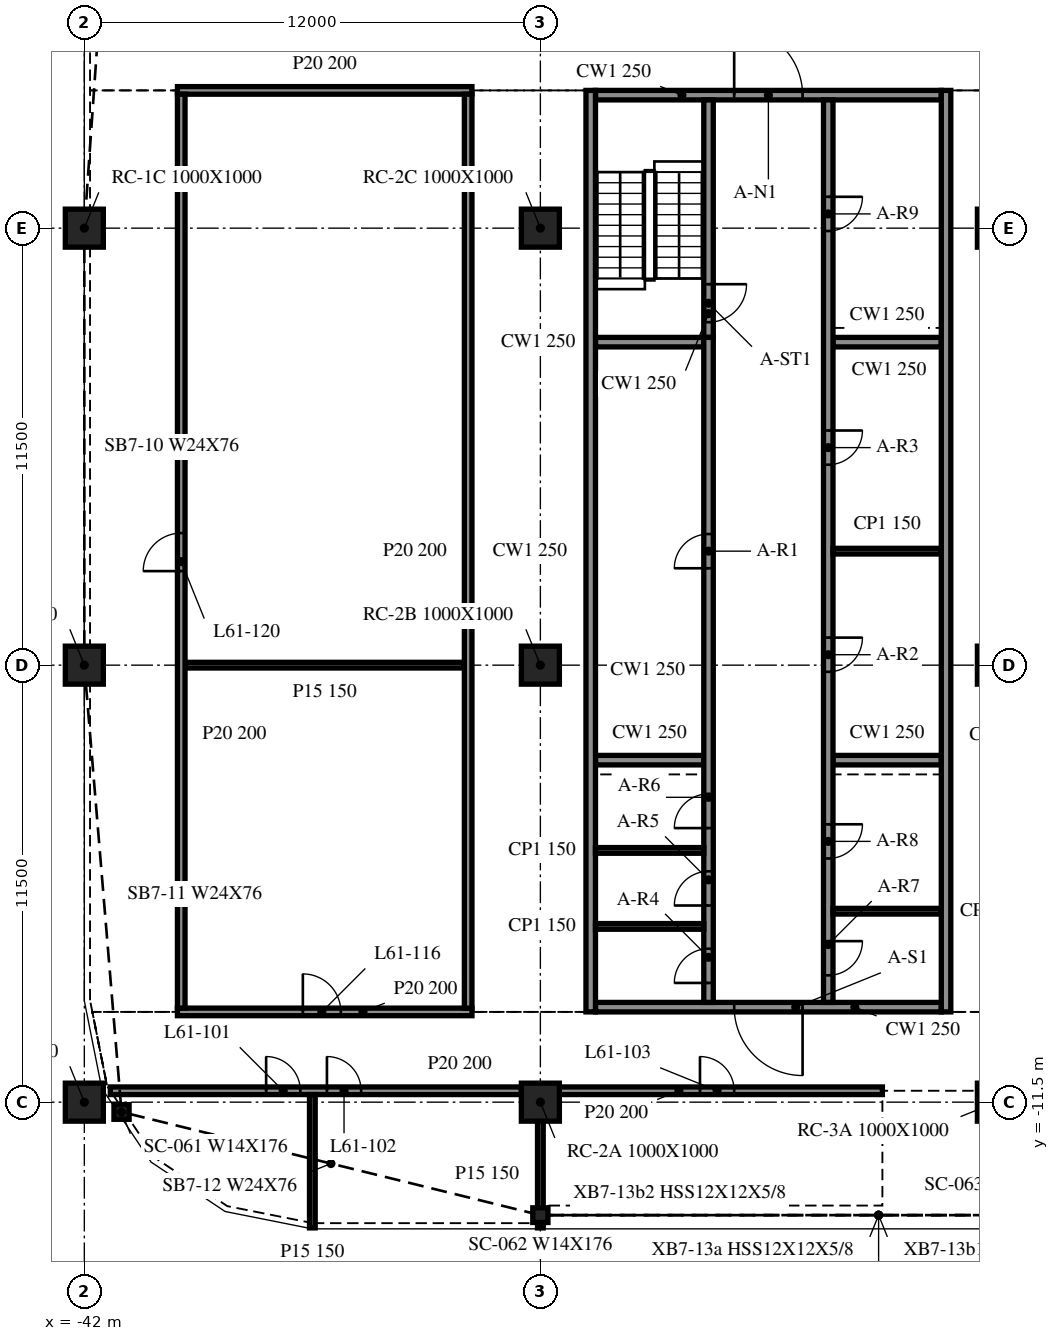
"""IFC4 building model, lengths in metres.
Left out: names, types, materials, properties, quantities, classifications, styles, units other than length and angle.
Written with IfcOpenShell. Run it as: python <this file> out.ifc"""

import sys

from ifc_helpers import new_model, si_unit, direction, frame, frame_2d, origin, origin_2d, place, context, subcontext, project, spatial, rectangle, i_section, extrude, element, fill, save


model = new_model("IFC4")
c1 = context("Model", 3, precision=1e-05, world=origin(), true_north=direction((0.0, 1.0)))
c2 = subcontext(c1, "Body", "Model", "MODEL_VIEW")
j1 = project(units=[si_unit("LENGTHUNIT", "METRE"), si_unit("PLANEANGLEUNIT", "RADIAN")], contexts=[c1])
p1 = place(None, origin())
s1 = spatial("IfcSite", under=j1, at=p1, CompositionType="ELEMENT")
p2 = place(p1, origin())
s2 = spatial("IfcBuilding", under=s1, at=p2, CompositionType="ELEMENT")
p3 = place(p2, frame((0.0, 0.0, 251.4)))
s3 = spatial("IfcBuildingStorey", under=s2, at=p3, CompositionType="ELEMENT", Elevation=251.4)
for number, where, z_axis, x_axis in (
    (1, (-42.0, -11.5, -0.34), (0.0, 0.0, 1.0), (1.0, 0.0, 0.0)),
    (2, (-42.0, 0.0, -0.34), (0.0, 0.0, 1.0), (1.0, 0.0, 0.0)),
    (3, (-42.0, 11.5, -0.34), (0.0, 0.0, 1.0), (1.0, 0.0, 0.0)),
    (4, (-30.0, -11.5, -0.34), (0.0, 0.0, 1.0), (1.0, 0.0, 0.0)),
    (5, (-30.0, 0.0, -0.34), (0.0, 0.0, 1.0), (1.0, 0.0, 0.0)),
    (6, (-30.0, 11.5, -0.34), (0.0, 0.0, 1.0), (1.0, 0.0, 0.0)),
    (7, (-18.0, -11.5, -0.34), (0.0, 0.0, 1.0), (1.0, 0.0, 0.0)),
    (8, (-18.0, 0.0, -0.34), (0.0, 0.0, 1.0), (1.0, 0.0, 0.0)),
    (9, (-18.0, 11.5, -0.34), (0.0, 0.0, 1.0), (1.0, 0.0, 0.0)),
):
    element("IfcColumn", number, at=place(p3, frame(where, z_axis=z_axis, x_axis=x_axis)), inside=s3, PredefinedType="COLUMN", context=c2, shape_type="SweptSolid", body=[
        extrude(rectangle(XDim=1.0, YDim=1.0, at=origin_2d()), origin(), (0.0, 0.0, 1.0), 3.8),
    ])
for number, where, z_axis, x_axis in (
    (10, (-41.021, -11.758, -0.34), (0.0, 0.0, 1.0), (1.0, 0.0, 0.0)),
    (11, (-30.0, -14.473, -0.34), (0.0, 0.0, 1.0), (1.0, 0.0, 0.0)),
):
    element("IfcColumn", number, at=place(p3, frame(where, z_axis=z_axis, x_axis=x_axis)), inside=s3, PredefinedType="COLUMN", context=c2, shape_type="SweptSolid", body=[
        extrude(i_section(OverallWidth=0.399, OverallDepth=0.386, WebThickness=0.021, FlangeThickness=0.033, at=origin_2d()), origin(), (0.0, 0.0, 1.0), 3.8),
    ])
for number, where, z_axis, x_axis in (
    (12, (-28.675, 15.125, 0.0), (0.0, 0.0, 1.0), (0.0, -1.0, 0.0)),
    (13, (-19.325, -9.125, 0.0), (0.0, 0.0, 1.0), (0.0, 1.0, 0.0)),
):
    element("IfcWall", number, at=place(p3, frame(where, z_axis=z_axis, x_axis=x_axis)), inside=s3, PredefinedType="SOLIDWALL", context=c2, shape_type="SweptSolid", body=[
        extrude(rectangle(XDim=24.25, YDim=0.25, at=frame_2d((12.125, 0.0))), origin(), (0.0, 0.0, 1.0), 3.46),
    ])
p4 = place(p3, frame((-19.45, -9.0, 0.0), z_axis=(0.0, 0.0, 1.0), x_axis=(-1.0, 0.0, 0.0)))
e14 = element("IfcWall", 14, at=p4, inside=s3, PredefinedType="SOLIDWALL", context=c2, shape_type="SweptSolid", body=[
    extrude(rectangle(XDim=9.1, YDim=0.25, at=frame_2d((4.55, 0.0))), origin(), (0.0, 0.0, 1.0), 3.46),
])
p5 = place(p4, frame((3.65, 0.0, 0.0)))
e15 = element("IfcOpeningElement", 15, at=p5, cuts=e14, PredefinedType="OPENING", context=c2, shape_type="SweptSolid", body=[
    extrude(rectangle(XDim=1.8, YDim=2.1, at=frame_2d((0.9, 1.05))), frame((0.0, 0.135, 0.0), z_axis=(0.0, -1.0, 0.0), x_axis=(1.0, 0.0, 0.0)), (0.0, 0.0, 1.0), 0.27),
])
p6 = place(p3, frame((-28.55, 15.0, 0.0), z_axis=(0.0, 0.0, 1.0), x_axis=(1.0, 0.0, 0.0)))
e16 = element("IfcWall", 16, at=p6, inside=s3, PredefinedType="SOLIDWALL", context=c2, shape_type="SweptSolid", body=[
    extrude(rectangle(XDim=9.1, YDim=0.25, at=frame_2d((4.55, 0.0))), origin(), (0.0, 0.0, 1.0), 3.46),
])
p7 = place(p6, frame((3.65, 0.0, 0.0)))
e17 = element("IfcOpeningElement", 17, at=p7, cuts=e16, PredefinedType="OPENING", context=c2, shape_type="SweptSolid", body=[
    extrude(rectangle(XDim=1.8, YDim=2.1, at=frame_2d((0.9, 1.05))), frame((0.0, 0.135, 0.0), z_axis=(0.0, -1.0, 0.0), x_axis=(1.0, 0.0, 0.0)), (0.0, 0.0, 1.0), 0.27),
])
p8 = place(p3, frame((-25.575, -8.875, 0.0), z_axis=(0.0, 0.0, 1.0), x_axis=(0.0, 1.0, 0.0)))
e18 = element("IfcWall", 18, at=p8, inside=s3, PredefinedType="SOLIDWALL", context=c2, shape_type="SweptSolid", body=[
    extrude(rectangle(XDim=17.5, YDim=0.25, at=frame_2d((8.75, 0.0))), origin(), (0.0, 0.0, 1.0), 3.46),
])
p9 = place(p8, frame((11.425, 0.0, 0.0)))
e19 = element("IfcOpeningElement", 19, at=p9, cuts=e18, PredefinedType="OPENING", context=c2, shape_type="SweptSolid", body=[
    extrude(rectangle(XDim=0.9, YDim=2.1, at=frame_2d((0.45, 1.05))), frame((0.0, 0.135, 0.0), z_axis=(0.0, -1.0, 0.0), x_axis=(1.0, 0.0, 0.0)), (0.0, 0.0, 1.0), 0.27),
])
p10 = place(p8, frame((0.512, 0.0, 0.0)))
e20 = element("IfcOpeningElement", 20, at=p10, cuts=e18, PredefinedType="OPENING", context=c2, shape_type="SweptSolid", body=[
    extrude(rectangle(XDim=0.9, YDim=2.1, at=frame_2d((0.45, 1.05))), frame((0.0, 0.135, 0.0), z_axis=(0.0, -1.0, 0.0), x_axis=(1.0, 0.0, 0.0)), (0.0, 0.0, 1.0), 0.27),
])
p11 = place(p8, frame((2.55, 0.0, 0.0)))
e21 = element("IfcOpeningElement", 21, at=p11, cuts=e18, PredefinedType="OPENING", context=c2, shape_type="SweptSolid", body=[
    extrude(rectangle(XDim=0.9, YDim=2.1, at=frame_2d((0.45, 1.05))), frame((0.0, 0.135, 0.0), z_axis=(0.0, -1.0, 0.0), x_axis=(1.0, 0.0, 0.0)), (0.0, 0.0, 1.0), 0.27),
])
p12 = place(p8, frame((4.587, 0.0, 0.0)))
e22 = element("IfcOpeningElement", 22, at=p12, cuts=e18, PredefinedType="OPENING", context=c2, shape_type="SweptSolid", body=[
    extrude(rectangle(XDim=0.9, YDim=2.1, at=frame_2d((0.45, 1.05))), frame((0.0, 0.135, 0.0), z_axis=(0.0, -1.0, 0.0), x_axis=(1.0, 0.0, 0.0)), (0.0, 0.0, 1.0), 0.27),
])
p13 = place(p3, frame((-25.575, 14.875, 0.0), z_axis=(0.0, 0.0, 1.0), x_axis=(0.0, -1.0, 0.0)))
e23 = element("IfcWall", 23, at=p13, inside=s3, PredefinedType="SOLIDWALL", context=c2, shape_type="SweptSolid", body=[
    extrude(rectangle(XDim=6.25, YDim=0.25, at=frame_2d((3.125, 0.0))), origin(), (0.0, 0.0, 1.0), 3.46),
])
p14 = place(p13, frame((4.85, 0.0, 0.0)))
e24 = element("IfcOpeningElement", 24, at=p14, cuts=e23, PredefinedType="OPENING", context=c2, shape_type="SweptSolid", body=[
    extrude(rectangle(XDim=1.0, YDim=2.1, at=frame_2d((0.5, 1.05))), frame((0.0, 0.135, 0.0), z_axis=(0.0, -1.0, 0.0), x_axis=(1.0, 0.0, 0.0)), (0.0, 0.0, 1.0), 0.27),
])
p15 = place(p3, frame((-22.425, 14.875, 0.0), z_axis=(0.0, 0.0, 1.0), x_axis=(0.0, -1.0, 0.0)))
e25 = element("IfcWall", 25, at=p15, inside=s3, PredefinedType="SOLIDWALL", context=c2, shape_type="SweptSolid", body=[
    extrude(rectangle(XDim=23.75, YDim=0.25, at=frame_2d((11.875, 0.0))), origin(), (0.0, 0.0, 1.0), 3.46),
])
p16 = place(p15, frame((14.15, 0.0, 0.0)))
e26 = element("IfcOpeningElement", 26, at=p16, cuts=e25, PredefinedType="OPENING", context=c2, shape_type="SweptSolid", body=[
    extrude(rectangle(XDim=0.9, YDim=2.1, at=frame_2d((0.45, 1.05))), frame((0.0, 0.135, 0.0), z_axis=(0.0, -1.0, 0.0), x_axis=(1.0, 0.0, 0.0)), (0.0, 0.0, 1.0), 0.27),
])
p17 = place(p15, frame((8.7, 0.0, 0.0)))
e27 = element("IfcOpeningElement", 27, at=p17, cuts=e25, PredefinedType="OPENING", context=c2, shape_type="SweptSolid", body=[
    extrude(rectangle(XDim=0.9, YDim=2.1, at=frame_2d((0.45, 1.05))), frame((0.0, 0.135, 0.0), z_axis=(0.0, -1.0, 0.0), x_axis=(1.0, 0.0, 0.0)), (0.0, 0.0, 1.0), 0.27),
])
p18 = place(p15, frame((22.137, 0.0, 0.0)))
e28 = element("IfcOpeningElement", 28, at=p18, cuts=e25, PredefinedType="OPENING", context=c2, shape_type="SweptSolid", body=[
    extrude(rectangle(XDim=0.9, YDim=2.1, at=frame_2d((0.45, 1.05))), frame((0.0, 0.135, 0.0), z_axis=(0.0, -1.0, 0.0), x_axis=(1.0, 0.0, 0.0)), (0.0, 0.0, 1.0), 0.27),
])
p19 = place(p15, frame((19.062, 0.0, 0.0)))
e29 = element("IfcOpeningElement", 29, at=p19, cuts=e25, PredefinedType="OPENING", context=c2, shape_type="SweptSolid", body=[
    extrude(rectangle(XDim=0.9, YDim=2.1, at=frame_2d((0.45, 1.05))), frame((0.0, 0.135, 0.0), z_axis=(0.0, -1.0, 0.0), x_axis=(1.0, 0.0, 0.0)), (0.0, 0.0, 1.0), 0.27),
])
p20 = place(p15, frame((2.55, 0.0, 0.0)))
e30 = element("IfcOpeningElement", 30, at=p20, cuts=e25, PredefinedType="OPENING", context=c2, shape_type="SweptSolid", body=[
    extrude(rectangle(XDim=0.9, YDim=2.1, at=frame_2d((0.45, 1.05))), frame((0.0, 0.135, 0.0), z_axis=(0.0, -1.0, 0.0), x_axis=(1.0, 0.0, 0.0)), (0.0, 0.0, 1.0), 0.27),
])
for number, where, z_axis, x_axis in (
    (31, (-28.55, -2.5, 0.0), (0.0, 0.0, 1.0), (1.0, 0.0, 0.0)),
    (32, (-28.55, 8.5, 0.0), (0.0, 0.0, 1.0), (1.0, 0.0, 0.0)),
    (33, (-22.3, -2.5, 0.0), (0.0, 0.0, 1.0), (1.0, 0.0, 0.0)),
    (34, (-22.3, 8.5, 0.0), (0.0, 0.0, 1.0), (1.0, 0.0, 0.0)),
):
    element("IfcWall", number, at=place(p3, frame(where, z_axis=z_axis, x_axis=x_axis)), inside=s3, PredefinedType="SOLIDWALL", context=c2, shape_type="SweptSolid", body=[
        extrude(rectangle(XDim=2.85, YDim=0.25, at=frame_2d((1.425, 0.0))), origin(), (0.0, 0.0, 1.0), 3.46),
    ])
for number, where, z_axis, x_axis in (
    (35, (-22.3, 3.0, 0.0), (0.0, 0.0, 1.0), (1.0, 0.0, 0.0)),
    (36, (-28.55, -6.875, 0.0), (0.0, 0.0, 1.0), (1.0, 0.0, 0.0)),
    (37, (-28.55, -4.875, 0.0), (0.0, 0.0, 1.0), (1.0, 0.0, 0.0)),
    (38, (-22.3, -6.475, 0.0), (0.0, 0.0, 1.0), (1.0, 0.0, 0.0)),
):
    element("IfcWall", number, at=place(p3, frame(where, z_axis=z_axis, x_axis=x_axis)), inside=s3, PredefinedType="PARTITIONING", context=c2, shape_type="SweptSolid", body=[
        extrude(rectangle(XDim=2.85, YDim=0.15, at=frame_2d((1.425, 0.0))), origin(), (0.0, 0.0, 1.0), 3.46),
    ])
p21 = place(p3, frame((-41.316, -11.2, 0.0), z_axis=(0.0, 0.0, 1.0), x_axis=(1.0, 0.0, 0.0)))
e39 = element("IfcWall", 39, at=p21, inside=s3, PredefinedType="PARTITIONING", context=c2, shape_type="SweptSolid", body=[
    extrude(rectangle(XDim=10.816, YDim=0.2, at=frame_2d((5.408, 0.0))), origin(), (0.0, 0.0, 1.0), 3.46),
])
p22 = place(p21, frame((4.1, 0.0, 0.0)))
e40 = element("IfcOpeningElement", 40, at=p22, cuts=e39, PredefinedType="OPENING", context=c2, shape_type="SweptSolid", body=[
    extrude(rectangle(XDim=0.9, YDim=2.1, at=frame_2d((0.45, 1.05))), frame((0.0, 0.11, 0.0), z_axis=(0.0, -1.0, 0.0), x_axis=(1.0, 0.0, 0.0)), (0.0, 0.0, 1.0), 0.22),
])
p23 = place(p21, frame((5.7, 0.0, 0.0)))
e41 = element("IfcOpeningElement", 41, at=p23, cuts=e39, PredefinedType="OPENING", context=c2, shape_type="SweptSolid", body=[
    extrude(rectangle(XDim=0.9, YDim=2.1, at=frame_2d((0.45, 1.05))), frame((0.0, 0.11, 0.0), z_axis=(0.0, -1.0, 0.0), x_axis=(1.0, 0.0, 0.0)), (0.0, 0.0, 1.0), 0.22),
])
p24 = place(p3, frame((-29.5, -11.2, 0.0), z_axis=(0.0, 0.0, 1.0), x_axis=(1.0, 0.0, 0.0)))
e42 = element("IfcWall", 42, at=p24, inside=s3, PredefinedType="PARTITIONING", context=c2, shape_type="SweptSolid", body=[
    extrude(rectangle(XDim=8.5, YDim=0.2, at=frame_2d((4.25, 0.0))), origin(), (0.0, 0.0, 1.0), 3.46),
])
p25 = place(p24, frame((3.7, 0.0, 0.0)))
e43 = element("IfcOpeningElement", 43, at=p25, cuts=e42, PredefinedType="OPENING", context=c2, shape_type="SweptSolid", body=[
    extrude(rectangle(XDim=0.9, YDim=2.1, at=frame_2d((0.45, 1.05))), frame((0.0, 0.11, 0.0), z_axis=(0.0, -1.0, 0.0), x_axis=(1.0, 0.0, 0.0)), (0.0, 0.0, 1.0), 0.22),
])
p26 = place(p3, frame((-39.55, -9.125, 0.0), z_axis=(0.0, 0.0, 1.0), x_axis=(1.0, 0.0, 0.0)))
e44 = element("IfcWall", 44, at=p26, inside=s3, PredefinedType="PARTITIONING", context=c2, shape_type="SweptSolid", body=[
    extrude(rectangle(XDim=7.75, YDim=0.2, at=frame_2d((3.875, 0.0))), origin(), (0.0, 0.0, 1.0), 3.46),
])
p27 = place(p26, frame((3.3, 0.0, 0.0)))
e45 = element("IfcOpeningElement", 45, at=p27, cuts=e44, PredefinedType="OPENING", context=c2, shape_type="SweptSolid", body=[
    extrude(rectangle(XDim=1.0, YDim=2.1, at=frame_2d((0.5, 1.05))), frame((0.0, 0.11, 0.0), z_axis=(0.0, -1.0, 0.0), x_axis=(1.0, 0.0, 0.0)), (0.0, 0.0, 1.0), 0.22),
])
p28 = place(p3, frame((-39.35, 0.0, 0.0), z_axis=(0.0, 0.0, 1.0), x_axis=(1.0, 0.0, 0.0)))
e46 = element("IfcWall", 46, at=p28, inside=s3, PredefinedType="PARTITIONING", context=c2, shape_type="SweptSolid", body=[
    extrude(rectangle(XDim=7.35, YDim=0.15, at=frame_2d((3.675, 0.0))), origin(), (0.0, 0.0, 1.0), 3.46),
])
p29 = place(p3, frame((-39.55, 15.125, 0.0), z_axis=(0.0, 0.0, 1.0), x_axis=(1.0, 0.0, 0.0)))
e47 = element("IfcWall", 47, at=p29, inside=s3, PredefinedType="PARTITIONING", context=c2, shape_type="SweptSolid", body=[
    extrude(rectangle(XDim=7.75, YDim=0.2, at=frame_2d((3.875, 0.0))), origin(), (0.0, 0.0, 1.0), 3.46),
])
p30 = place(p3, frame((-39.45, -9.025, 0.0), z_axis=(0.0, 0.0, 1.0), x_axis=(0.0, 1.0, 0.0)))
e48 = element("IfcWall", 48, at=p30, inside=s3, PredefinedType="PARTITIONING", context=c2, shape_type="SweptSolid", body=[
    extrude(rectangle(XDim=24.05, YDim=0.2, at=frame_2d((12.025, 0.0))), origin(), (0.0, 0.0, 1.0), 3.46),
])
p31 = place(p30, frame((11.5, 0.0, 0.0)))
e49 = element("IfcOpeningElement", 49, at=p31, cuts=e48, PredefinedType="OPENING", context=c2, shape_type="SweptSolid", body=[
    extrude(rectangle(XDim=1.0, YDim=2.1, at=frame_2d((0.5, 1.05))), frame((0.0, 0.11, 0.0), z_axis=(0.0, -1.0, 0.0), x_axis=(1.0, 0.0, 0.0)), (0.0, 0.0, 1.0), 0.22),
])
p32 = place(p3, frame((-36.0, -14.809, 0.0), z_axis=(0.0, 0.0, 1.0), x_axis=(0.0, 1.0, 0.0)))
e50 = element("IfcWall", 50, at=p32, inside=s3, PredefinedType="PARTITIONING", context=c2, shape_type="SweptSolid", body=[
    extrude(rectangle(XDim=3.509, YDim=0.15, at=frame_2d((1.754, 0.0))), origin(), (0.0, 0.0, 1.0), 3.46),
])
p33 = place(p3, frame((-31.9, -9.025, 0.0), z_axis=(0.0, 0.0, 1.0), x_axis=(0.0, 1.0, 0.0)))
e51 = element("IfcWall", 51, at=p33, inside=s3, PredefinedType="PARTITIONING", context=c2, shape_type="SweptSolid", body=[
    extrude(rectangle(XDim=24.05, YDim=0.2, at=frame_2d((12.025, 0.0))), origin(), (0.0, 0.0, 1.0), 3.46),
])
p34 = place(p3, frame((-30.0, -14.809, 0.0), z_axis=(0.0, 0.0, 1.0), x_axis=(0.0, 1.0, 0.0)))
e52 = element("IfcWall", 52, at=p34, inside=s3, PredefinedType="PARTITIONING", context=c2, shape_type="SweptSolid", body=[
    extrude(rectangle(XDim=2.809, YDim=0.15, at=frame_2d((1.405, 0.0))), origin(), (0.0, 0.0, 1.0), 3.46),
])
p35 = place(p5, origin())
e53 = element("IfcDoor", 53, at=p35, inside=s3, OperationType="DOUBLE_DOOR_SINGLE_SWING", PredefinedType="DOOR", context=c2, shape_type="SweptSolid", body=[
    extrude(rectangle(XDim=1.8, YDim=2.1, at=frame_2d((0.9, 1.05))), frame((0.0, 0.025, 0.0), z_axis=(0.0, -1.0, 0.0), x_axis=(1.0, 0.0, 0.0)), (0.0, 0.0, 1.0), 0.05),
])
fill(e15, e53)
p36 = place(p7, origin())
e54 = element("IfcDoor", 54, at=p36, inside=s3, OperationType="DOUBLE_DOOR_SINGLE_SWING", PredefinedType="DOOR", context=c2, shape_type="SweptSolid", body=[
    extrude(rectangle(XDim=1.8, YDim=2.1, at=frame_2d((0.9, 1.05))), frame((0.0, 0.025, 0.0), z_axis=(0.0, -1.0, 0.0), x_axis=(1.0, 0.0, 0.0)), (0.0, 0.0, 1.0), 0.05),
])
fill(e17, e54)
p37 = place(p9, origin())
e55 = element("IfcDoor", 55, at=p37, inside=s3, OperationType="SINGLE_SWING_LEFT", PredefinedType="DOOR", context=c2, shape_type="SweptSolid", body=[
    extrude(rectangle(XDim=0.9, YDim=2.1, at=frame_2d((0.45, 1.05))), frame((0.0, 0.025, 0.0), z_axis=(0.0, -1.0, 0.0), x_axis=(1.0, 0.0, 0.0)), (0.0, 0.0, 1.0), 0.05),
])
fill(e19, e55)
p38 = place(p16, origin())
e56 = element("IfcDoor", 56, at=p38, inside=s3, OperationType="SINGLE_SWING_RIGHT", PredefinedType="DOOR", context=c2, shape_type="SweptSolid", body=[
    extrude(rectangle(XDim=0.9, YDim=2.1, at=frame_2d((0.45, 1.05))), frame((0.0, 0.025, 0.0), z_axis=(0.0, -1.0, 0.0), x_axis=(1.0, 0.0, 0.0)), (0.0, 0.0, 1.0), 0.05),
])
fill(e26, e56)
p39 = place(p17, origin())
e57 = element("IfcDoor", 57, at=p39, inside=s3, OperationType="SINGLE_SWING_LEFT", PredefinedType="DOOR", context=c2, shape_type="SweptSolid", body=[
    extrude(rectangle(XDim=0.9, YDim=2.1, at=frame_2d((0.45, 1.05))), frame((0.0, 0.025, 0.0), z_axis=(0.0, -1.0, 0.0), x_axis=(1.0, 0.0, 0.0)), (0.0, 0.0, 1.0), 0.05),
])
fill(e27, e57)
p40 = place(p10, origin())
e58 = element("IfcDoor", 58, at=p40, inside=s3, OperationType="SINGLE_SWING_RIGHT", PredefinedType="DOOR", context=c2, shape_type="SweptSolid", body=[
    extrude(rectangle(XDim=0.9, YDim=2.1, at=frame_2d((0.45, 1.05))), frame((0.0, 0.025, 0.0), z_axis=(0.0, -1.0, 0.0), x_axis=(1.0, 0.0, 0.0)), (0.0, 0.0, 1.0), 0.05),
])
fill(e20, e58)
p41 = place(p11, origin())
e59 = element("IfcDoor", 59, at=p41, inside=s3, OperationType="SINGLE_SWING_LEFT", PredefinedType="DOOR", context=c2, shape_type="SweptSolid", body=[
    extrude(rectangle(XDim=0.9, YDim=2.1, at=frame_2d((0.45, 1.05))), frame((0.0, 0.025, 0.0), z_axis=(0.0, -1.0, 0.0), x_axis=(1.0, 0.0, 0.0)), (0.0, 0.0, 1.0), 0.05),
])
fill(e21, e59)
p42 = place(p12, origin())
e60 = element("IfcDoor", 60, at=p42, inside=s3, OperationType="SINGLE_SWING_RIGHT", PredefinedType="DOOR", context=c2, shape_type="SweptSolid", body=[
    extrude(rectangle(XDim=0.9, YDim=2.1, at=frame_2d((0.45, 1.05))), frame((0.0, 0.025, 0.0), z_axis=(0.0, -1.0, 0.0), x_axis=(1.0, 0.0, 0.0)), (0.0, 0.0, 1.0), 0.05),
])
fill(e22, e60)
p43 = place(p18, origin())
e61 = element("IfcDoor", 61, at=p43, inside=s3, OperationType="SINGLE_SWING_LEFT", PredefinedType="DOOR", context=c2, shape_type="SweptSolid", body=[
    extrude(rectangle(XDim=0.9, YDim=2.1, at=frame_2d((0.45, 1.05))), frame((0.0, 0.025, 0.0), z_axis=(0.0, -1.0, 0.0), x_axis=(1.0, 0.0, 0.0)), (0.0, 0.0, 1.0), 0.05),
])
fill(e28, e61)
p44 = place(p19, origin())
e62 = element("IfcDoor", 62, at=p44, inside=s3, OperationType="SINGLE_SWING_RIGHT", PredefinedType="DOOR", context=c2, shape_type="SweptSolid", body=[
    extrude(rectangle(XDim=0.9, YDim=2.1, at=frame_2d((0.45, 1.05))), frame((0.0, 0.025, 0.0), z_axis=(0.0, -1.0, 0.0), x_axis=(1.0, 0.0, 0.0)), (0.0, 0.0, 1.0), 0.05),
])
fill(e29, e62)
p45 = place(p20, origin())
e63 = element("IfcDoor", 63, at=p45, inside=s3, OperationType="SINGLE_SWING_LEFT", PredefinedType="DOOR", context=c2, shape_type="SweptSolid", body=[
    extrude(rectangle(XDim=0.9, YDim=2.1, at=frame_2d((0.45, 1.05))), frame((0.0, 0.025, 0.0), z_axis=(0.0, -1.0, 0.0), x_axis=(1.0, 0.0, 0.0)), (0.0, 0.0, 1.0), 0.05),
])
fill(e30, e63)
p46 = place(p14, origin())
e64 = element("IfcDoor", 64, at=p46, inside=s3, OperationType="SINGLE_SWING_RIGHT", PredefinedType="DOOR", context=c2, shape_type="SweptSolid", body=[
    extrude(rectangle(XDim=1.0, YDim=2.1, at=frame_2d((0.5, 1.05))), frame((0.0, 0.025, 0.0), z_axis=(0.0, -1.0, 0.0), x_axis=(1.0, 0.0, 0.0)), (0.0, 0.0, 1.0), 0.05),
])
fill(e24, e64)
p47 = place(p22, origin())
e65 = element("IfcDoor", 65, at=p47, inside=s3, OperationType="SINGLE_SWING_RIGHT", PredefinedType="DOOR", context=c2, shape_type="SweptSolid", body=[
    extrude(rectangle(XDim=0.9, YDim=2.1, at=frame_2d((0.45, 1.05))), frame((0.0, 0.025, 0.0), z_axis=(0.0, -1.0, 0.0), x_axis=(1.0, 0.0, 0.0)), (0.0, 0.0, 1.0), 0.05),
])
fill(e40, e65)
p48 = place(p23, origin())
e66 = element("IfcDoor", 66, at=p48, inside=s3, OperationType="SINGLE_SWING_LEFT", PredefinedType="DOOR", context=c2, shape_type="SweptSolid", body=[
    extrude(rectangle(XDim=0.9, YDim=2.1, at=frame_2d((0.45, 1.05))), frame((0.0, 0.025, 0.0), z_axis=(0.0, -1.0, 0.0), x_axis=(1.0, 0.0, 0.0)), (0.0, 0.0, 1.0), 0.05),
])
fill(e41, e66)
p49 = place(p25, origin())
e67 = element("IfcDoor", 67, at=p49, inside=s3, OperationType="SINGLE_SWING_RIGHT", PredefinedType="DOOR", context=c2, shape_type="SweptSolid", body=[
    extrude(rectangle(XDim=0.9, YDim=2.1, at=frame_2d((0.45, 1.05))), frame((0.0, 0.025, 0.0), z_axis=(0.0, -1.0, 0.0), x_axis=(1.0, 0.0, 0.0)), (0.0, 0.0, 1.0), 0.05),
])
fill(e43, e67)
p50 = place(p27, origin())
e68 = element("IfcDoor", 68, at=p50, inside=s3, OperationType="SINGLE_SWING_LEFT", PredefinedType="DOOR", context=c2, shape_type="SweptSolid", body=[
    extrude(rectangle(XDim=1.0, YDim=2.1, at=frame_2d((0.5, 1.05))), frame((0.0, 0.025, 0.0), z_axis=(0.0, -1.0, 0.0), x_axis=(1.0, 0.0, 0.0)), (0.0, 0.0, 1.0), 0.05),
])
fill(e45, e68)
p51 = place(p31, origin())
e69 = element("IfcDoor", 69, at=p51, inside=s3, OperationType="SINGLE_SWING_RIGHT", PredefinedType="DOOR", context=c2, shape_type="SweptSolid", body=[
    extrude(rectangle(XDim=1.0, YDim=2.1, at=frame_2d((0.5, 1.05))), frame((0.0, 0.025, 0.0), z_axis=(0.0, -1.0, 0.0), x_axis=(1.0, 0.0, 0.0)), (0.0, 0.0, 1.0), 0.05),
])
fill(e49, e69)
save(model, sys.argv[1])
